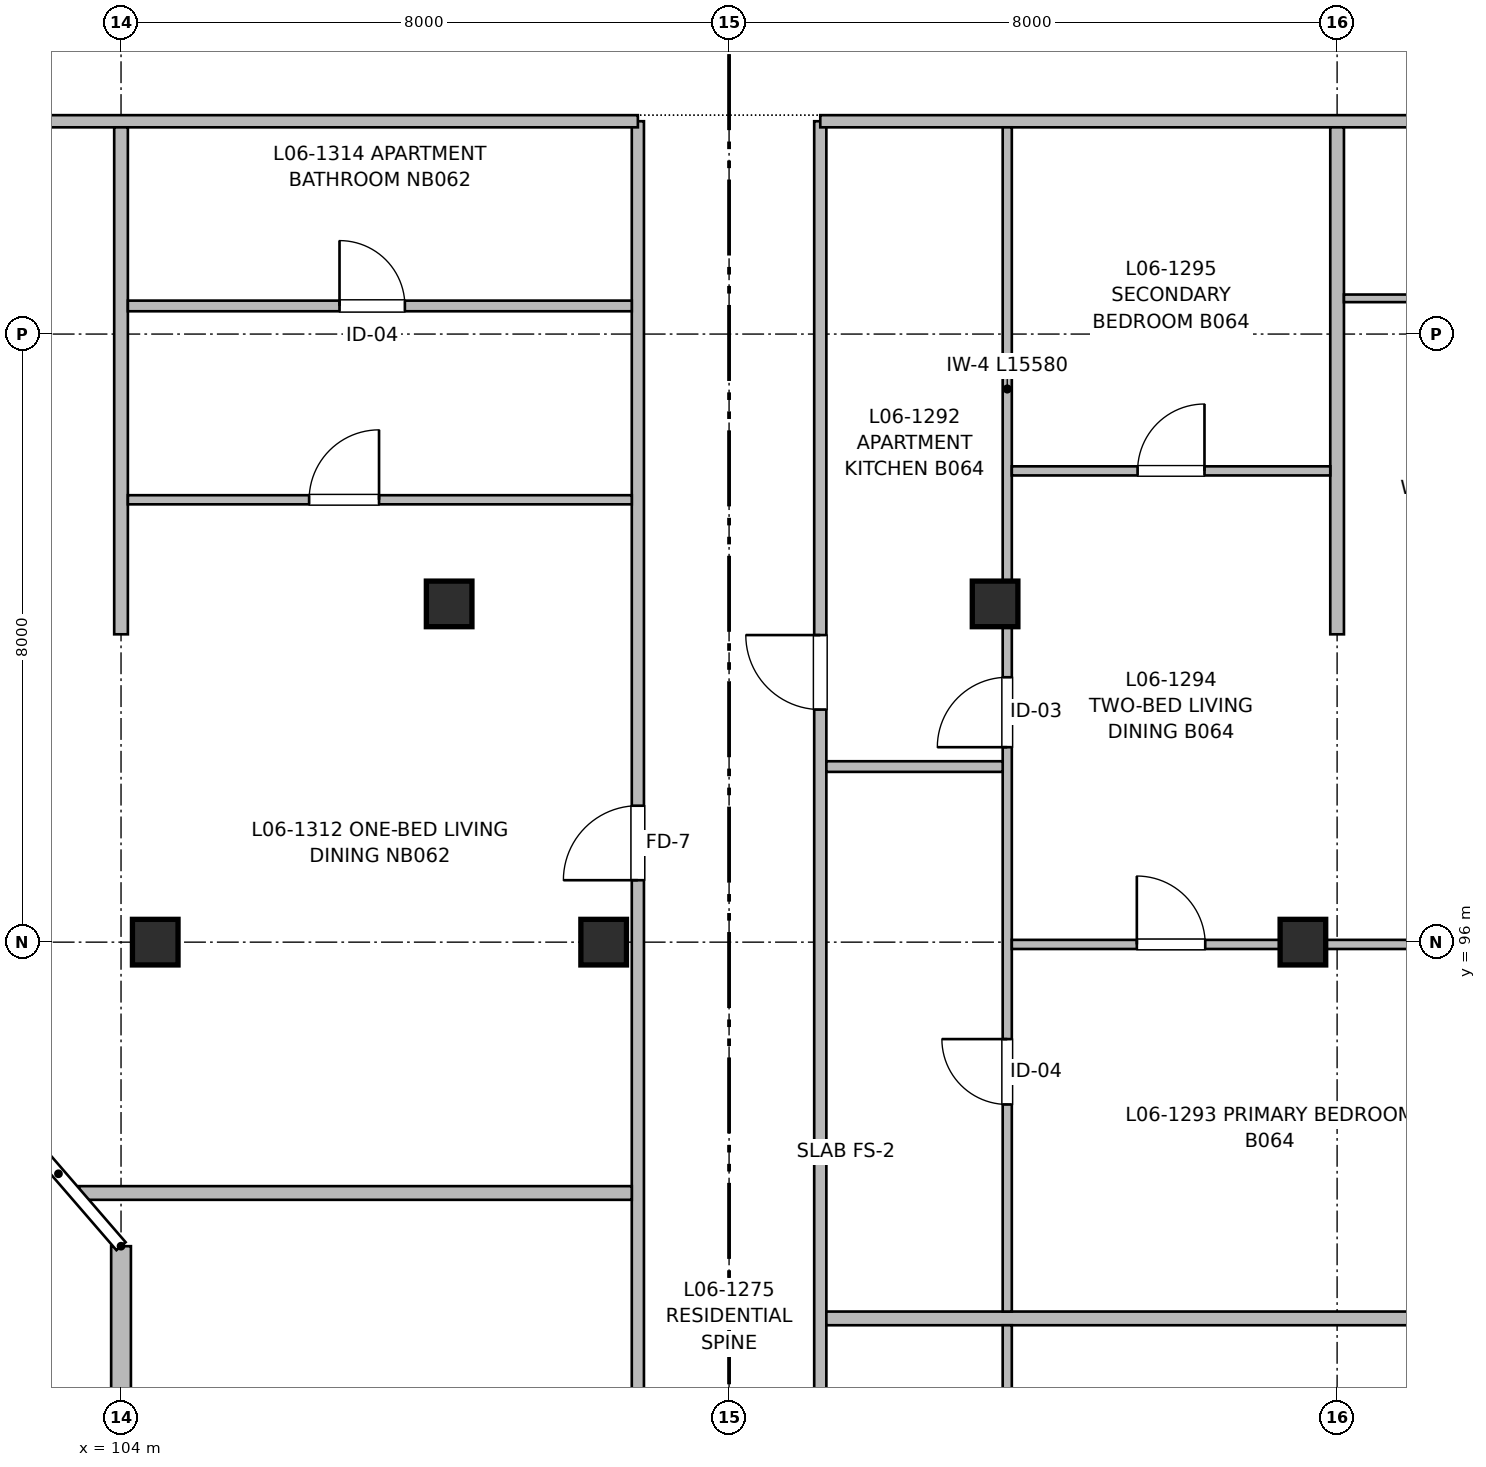
"""IFC4 building model, lengths in metres.
Left out: names, types, materials, properties, quantities, classifications, styles, units other than length and angle.
Written with IfcOpenShell. Run it as: python <this file> out.ifc"""

import sys

from ifc_helpers import new_model, si_unit, direction, frame, frame_2d, origin, origin_2d, place, context, subcontext, project, spatial, rectangle, extrude, element, fill, save


model = new_model("IFC4")
c1 = context("Model", 3, precision=1e-05, world=origin(), true_north=direction((0.0, 1.0)))
c2 = subcontext(c1, "Body", "Model", "MODEL_VIEW")
j1 = project(units=[si_unit("LENGTHUNIT", "METRE"), si_unit("PLANEANGLEUNIT", "RADIAN")], contexts=[c1])
p1 = place(None, origin())
s1 = spatial("IfcSite", under=j1, at=p1, CompositionType="ELEMENT")
p2 = place(p1, origin())
s2 = spatial("IfcBuilding", under=s1, at=p2, CompositionType="ELEMENT")
p3 = place(p2, frame((0.0, 0.0, 20.16)))
s3 = spatial("IfcBuildingStorey", under=s2, at=p3, CompositionType="ELEMENT", Elevation=20.16)
for number, where, z_axis, x_axis in (
    (1, (104.45, 96.0, 0.0), (0.0, 0.0, 1.0), (1.0, 0.0, 0.0)),
    (2, (108.317, 100.45, 0.0), (0.0, 0.0, 1.0), (1.0, 0.0, 0.0)),
    (3, (110.35, 96.0, 0.0), (0.0, 0.0, 1.0), (1.0, 0.0, 0.0)),
    (4, (115.5, 100.45, 0.0), (0.0, 0.0, 1.0), (1.0, 0.0, 0.0)),
    (5, (119.55, 96.0, 0.0), (0.0, 0.0, 1.0), (1.0, 0.0, 0.0)),
):
    element("IfcColumn", number, at=place(p3, frame(where, z_axis=z_axis, x_axis=x_axis)), inside=s3, PredefinedType="COLUMN", context=c2, shape_type="SweptSolid", body=[
        extrude(rectangle(XDim=0.6, YDim=0.6, at=origin_2d()), origin(), (0.0, 0.0, 1.0), 3.2),
    ])
p4 = place(p3, frame((104.0, 56.0, 0.0), z_axis=(0.0, 0.0, 1.0), x_axis=(0.0, 1.0, 0.0)))
e6 = element("IfcWall", 6, at=p4, inside=s3, PredefinedType="SOLIDWALL", context=c2, shape_type="SweptSolid", body=[
    extrude(rectangle(XDim=36.0, YDim=0.26, at=frame_2d((18.0, 0.0))), origin(), (0.0, 0.0, 1.0), 2.98),
])
p5 = place(p4, frame((3.9, 0.0, 0.0)))
e7 = element("IfcOpeningElement", 7, at=p5, cuts=e6, PredefinedType="OPENING", context=c2, shape_type="SweptSolid", body=[
    extrude(rectangle(XDim=1.2, YDim=2.2, at=frame_2d((0.6, 1.1))), frame((0.0, 0.14, 0.0), z_axis=(0.0, -1.0, 0.0), x_axis=(1.0, 0.0, 0.0)), (0.0, 0.0, 1.0), 0.28),
])
p6 = place(p4, frame((5.8, 0.0, 0.82)))
e8 = element("IfcOpeningElement", 8, at=p6, cuts=e6, PredefinedType="OPENING", context=c2, shape_type="SweptSolid", body=[
    extrude(rectangle(XDim=1.3, YDim=1.4, at=frame_2d((0.65, 0.7))), frame((0.0, 0.14, 0.0), z_axis=(0.0, -1.0, 0.0), x_axis=(1.0, 0.0, 0.0)), (0.0, 0.0, 1.0), 0.28),
])
p7 = place(p4, frame((12.6, 0.0, 0.72)))
e9 = element("IfcOpeningElement", 9, at=p7, cuts=e6, PredefinedType="OPENING", context=c2, shape_type="SweptSolid", body=[
    extrude(rectangle(XDim=1.8, YDim=1.5, at=frame_2d((0.9, 0.75))), frame((0.0, 0.14, 0.0), z_axis=(0.0, -1.0, 0.0), x_axis=(1.0, 0.0, 0.0)), (0.0, 0.0, 1.0), 0.28),
])
p8 = place(p4, frame((19.15, 0.0, 0.72)))
e10 = element("IfcOpeningElement", 10, at=p8, cuts=e6, PredefinedType="OPENING", context=c2, shape_type="SweptSolid", body=[
    extrude(rectangle(XDim=2.0, YDim=1.5, at=frame_2d((1.0, 0.75))), frame((0.0, 0.14, 0.0), z_axis=(0.0, -1.0, 0.0), x_axis=(1.0, 0.0, 0.0)), (0.0, 0.0, 1.0), 0.28),
])
p9 = place(p4, frame((30.675, 0.0, 0.77)))
e11 = element("IfcOpeningElement", 11, at=p9, cuts=e6, PredefinedType="OPENING", context=c2, shape_type="SweptSolid", body=[
    extrude(rectangle(XDim=1.65, YDim=1.45, at=frame_2d((0.825, 0.725))), frame((0.0, 0.14, 0.0), z_axis=(0.0, -1.0, 0.0), x_axis=(1.0, 0.0, 0.0)), (0.0, 0.0, 1.0), 0.28),
])
p10 = place(p3, frame((110.8, 56.16, 0.0), z_axis=(0.0, 0.0, 1.0), x_axis=(0.0, 1.0, 0.0)))
e12 = element("IfcWall", 12, at=p10, inside=s3, PredefinedType="PARTITIONING", context=c2, shape_type="SweptSolid", body=[
    extrude(rectangle(XDim=50.64, YDim=0.16, at=frame_2d((25.32, 0.0))), origin(), (0.0, 0.0, 1.0), 2.935),
])
p11 = place(p10, frame((12.84, 0.0, 0.0)))
e13 = element("IfcOpeningElement", 13, at=p11, cuts=e12, PredefinedType="OPENING", context=c2, shape_type="SweptSolid", body=[
    extrude(rectangle(XDim=1.1, YDim=2.15, at=frame_2d((0.55, 1.075))), frame((0.0, 0.09, 0.0), z_axis=(0.0, -1.0, 0.0), x_axis=(1.0, 0.0, 0.0)), (0.0, 0.0, 1.0), 0.18),
])
p12 = place(p10, frame((19.24, 0.0, 0.0)))
e14 = element("IfcOpeningElement", 14, at=p12, cuts=e12, PredefinedType="OPENING", context=c2, shape_type="SweptSolid", body=[
    extrude(rectangle(XDim=1.6, YDim=2.15, at=frame_2d((0.8, 1.075))), frame((0.0, 0.09, 0.0), z_axis=(0.0, -1.0, 0.0), x_axis=(1.0, 0.0, 0.0)), (0.0, 0.0, 1.0), 0.18),
])
p13 = place(p10, frame((1.8, 0.0, 0.0)))
e15 = element("IfcOpeningElement", 15, at=p13, cuts=e12, PredefinedType="OPENING", context=c2, shape_type="SweptSolid", body=[
    extrude(rectangle(XDim=0.96, YDim=2.15, at=frame_2d((0.48, 1.075))), frame((0.0, 0.09, 0.0), z_axis=(0.0, -1.0, 0.0), x_axis=(1.0, 0.0, 0.0)), (0.0, 0.0, 1.0), 0.18),
])
p14 = place(p10, frame((32.845, 0.0, 0.0)))
e16 = element("IfcOpeningElement", 16, at=p14, cuts=e12, PredefinedType="OPENING", context=c2, shape_type="SweptSolid", body=[
    extrude(rectangle(XDim=0.98, YDim=2.15, at=frame_2d((0.49, 1.075))), frame((0.0, 0.09, 0.0), z_axis=(0.0, -1.0, 0.0), x_axis=(1.0, 0.0, 0.0)), (0.0, 0.0, 1.0), 0.18),
])
p15 = place(p10, frame((40.655, 0.0, 0.0)))
e17 = element("IfcOpeningElement", 17, at=p15, cuts=e12, PredefinedType="OPENING", context=c2, shape_type="SweptSolid", body=[
    extrude(rectangle(XDim=0.98, YDim=2.15, at=frame_2d((0.49, 1.075))), frame((0.0, 0.09, 0.0), z_axis=(0.0, -1.0, 0.0), x_axis=(1.0, 0.0, 0.0)), (0.0, 0.0, 1.0), 0.18),
])
p16 = place(p3, frame((113.2, 56.16, 0.0), z_axis=(0.0, 0.0, 1.0), x_axis=(0.0, 1.0, 0.0)))
e18 = element("IfcWall", 18, at=p16, inside=s3, PredefinedType="PARTITIONING", context=c2, shape_type="SweptSolid", body=[
    extrude(rectangle(XDim=50.64, YDim=0.16, at=frame_2d((25.32, 0.0))), origin(), (0.0, 0.0, 1.0), 2.935),
])
p17 = place(p16, frame((5.59, 0.0, 0.0)))
e19 = element("IfcOpeningElement", 19, at=p17, cuts=e18, PredefinedType="OPENING", context=c2, shape_type="SweptSolid", body=[
    extrude(rectangle(XDim=0.98, YDim=2.15, at=frame_2d((0.49, 1.075))), frame((0.0, 0.09, 0.0), z_axis=(0.0, -1.0, 0.0), x_axis=(1.0, 0.0, 0.0)), (0.0, 0.0, 1.0), 0.18),
])
p18 = place(p16, frame((16.49, 0.0, 0.0)))
e20 = element("IfcOpeningElement", 20, at=p18, cuts=e18, PredefinedType="OPENING", context=c2, shape_type="SweptSolid", body=[
    extrude(rectangle(XDim=0.98, YDim=2.15, at=frame_2d((0.49, 1.075))), frame((0.0, 0.09, 0.0), z_axis=(0.0, -1.0, 0.0), x_axis=(1.0, 0.0, 0.0)), (0.0, 0.0, 1.0), 0.18),
])
p19 = place(p16, frame((28.55, 0.0, 0.0)))
e21 = element("IfcOpeningElement", 21, at=p19, cuts=e18, PredefinedType="OPENING", context=c2, shape_type="SweptSolid", body=[
    extrude(rectangle(XDim=0.98, YDim=2.15, at=frame_2d((0.49, 1.075))), frame((0.0, 0.09, 0.0), z_axis=(0.0, -1.0, 0.0), x_axis=(1.0, 0.0, 0.0)), (0.0, 0.0, 1.0), 0.18),
])
p20 = place(p16, frame((42.9, 0.0, 0.0)))
e22 = element("IfcOpeningElement", 22, at=p20, cuts=e18, PredefinedType="OPENING", context=c2, shape_type="SweptSolid", body=[
    extrude(rectangle(XDim=0.98, YDim=2.15, at=frame_2d((0.49, 1.075))), frame((0.0, 0.09, 0.0), z_axis=(0.0, -1.0, 0.0), x_axis=(1.0, 0.0, 0.0)), (0.0, 0.0, 1.0), 0.18),
])
p21 = place(p3, frame((93.66, 106.8, 0.0), z_axis=(0.0, 0.0, 1.0), x_axis=(1.0, 0.0, 0.0)))
e23 = element("IfcWall", 23, at=p21, inside=s3, PredefinedType="PARTITIONING", context=c2, shape_type="SweptSolid", body=[
    extrude(rectangle(XDim=17.14, YDim=0.16, at=frame_2d((8.57, 0.0))), origin(), (0.0, 0.0, 1.0), 2.935),
])
p22 = place(p3, frame((113.2, 106.8, 0.0), z_axis=(0.0, 0.0, 1.0), x_axis=(1.0, 0.0, 0.0)))
e24 = element("IfcWall", 24, at=p22, inside=s3, PredefinedType="PARTITIONING", context=c2, shape_type="SweptSolid", body=[
    extrude(rectangle(XDim=24.14, YDim=0.16, at=frame_2d((12.07, 0.0))), origin(), (0.0, 0.0, 1.0), 2.935),
])
p23 = place(p22, frame((19.575, 0.0, 0.0)))
e25 = element("IfcOpeningElement", 25, at=p23, cuts=e24, PredefinedType="OPENING", context=c2, shape_type="SweptSolid", body=[
    extrude(rectangle(XDim=1.05, YDim=2.15, at=frame_2d((0.525, 1.075))), frame((0.0, 0.09, 0.0), z_axis=(0.0, -1.0, 0.0), x_axis=(1.0, 0.0, 0.0)), (0.0, 0.0, 1.0), 0.18),
])
p24 = place(p22, frame((8.995, 0.0, 0.0)))
e26 = element("IfcOpeningElement", 26, at=p24, cuts=e24, PredefinedType="OPENING", context=c2, shape_type="SweptSolid", body=[
    extrude(rectangle(XDim=0.98, YDim=2.15, at=frame_2d((0.49, 1.075))), frame((0.0, 0.09, 0.0), z_axis=(0.0, -1.0, 0.0), x_axis=(1.0, 0.0, 0.0)), (0.0, 0.0, 1.0), 0.18),
])
for number, where, z_axis, x_axis in (
    (27, (120.0, 100.05, 0.0), (0.0, 0.0, 1.0), (0.0, 1.0, 0.0)),
    (28, (104.0, 100.05, 0.0), (0.0, 0.0, 1.0), (0.0, 1.0, 0.0)),
):
    element("IfcWall", number, at=place(p3, frame(where, z_axis=z_axis, x_axis=x_axis)), inside=s3, PredefinedType="PARTITIONING", context=c2, shape_type="SweptSolid", body=[
        extrude(rectangle(XDim=6.67, YDim=0.18, at=frame_2d((3.335, 0.0))), origin(), (0.0, 0.0, 1.0), 2.935),
    ])
p25 = place(p3, frame((113.28, 91.05, 0.0), z_axis=(0.0, 0.0, 1.0), x_axis=(1.0, 0.0, 0.0)))
e29 = element("IfcWall", 29, at=p25, inside=s3, PredefinedType="PARTITIONING", context=c2, shape_type="SweptSolid", body=[
    extrude(rectangle(XDim=9.115, YDim=0.18, at=frame_2d((4.558, 0.0))), origin(), (0.0, 0.0, 1.0), 2.935),
])
p26 = place(p3, frame((115.66, 77.99, 0.0), z_axis=(0.0, 0.0, 1.0), x_axis=(0.0, 1.0, 0.0)))
e30 = element("IfcWall", 30, at=p26, inside=s3, PredefinedType="PARTITIONING", context=c2, shape_type="SweptSolid", body=[
    extrude(rectangle(XDim=12.97, YDim=0.12, at=frame_2d((6.485, 0.0))), origin(), (0.0, 0.0, 1.0), 2.935),
])
p27 = place(p26, frame((2.269, 0.0, 0.0)))
e31 = element("IfcOpeningElement", 31, at=p27, cuts=e30, PredefinedType="OPENING", context=c2, shape_type="SweptSolid", body=[
    extrude(rectangle(XDim=0.86, YDim=2.1, at=frame_2d((0.43, 1.05))), frame((0.0, 0.07, 0.0), z_axis=(0.0, -1.0, 0.0), x_axis=(1.0, 0.0, 0.0)), (0.0, 0.0, 1.0), 0.14),
])
p28 = place(p26, frame((7.93, 0.0, 0.0)))
e32 = element("IfcOpeningElement", 32, at=p28, cuts=e30, PredefinedType="OPENING", context=c2, shape_type="SweptSolid", body=[
    extrude(rectangle(XDim=0.92, YDim=2.1, at=frame_2d((0.46, 1.05))), frame((0.0, 0.07, 0.0), z_axis=(0.0, -1.0, 0.0), x_axis=(1.0, 0.0, 0.0)), (0.0, 0.0, 1.0), 0.14),
])
p29 = place(p3, frame((115.66, 91.14, 0.0), z_axis=(0.0, 0.0, 1.0), x_axis=(0.0, 1.0, 0.0)))
e33 = element("IfcWall", 33, at=p29, inside=s3, PredefinedType="PARTITIONING", context=c2, shape_type="SweptSolid", body=[
    extrude(rectangle(XDim=15.58, YDim=0.12, at=frame_2d((7.79, 0.0))), origin(), (0.0, 0.0, 1.0), 2.68),
])
p30 = place(p29, frame((2.725, 0.0, 0.0)))
e34 = element("IfcOpeningElement", 34, at=p30, cuts=e33, PredefinedType="OPENING", context=c2, shape_type="SweptSolid", body=[
    extrude(rectangle(XDim=0.86, YDim=2.1, at=frame_2d((0.43, 1.05))), frame((0.0, 0.07, 0.0), z_axis=(0.0, -1.0, 0.0), x_axis=(1.0, 0.0, 0.0)), (0.0, 0.0, 1.0), 0.14),
])
p31 = place(p29, frame((7.425, 0.0, 0.0)))
e35 = element("IfcOpeningElement", 35, at=p31, cuts=e33, PredefinedType="OPENING", context=c2, shape_type="SweptSolid", body=[
    extrude(rectangle(XDim=0.92, YDim=2.1, at=frame_2d((0.46, 1.05))), frame((0.0, 0.07, 0.0), z_axis=(0.0, -1.0, 0.0), x_axis=(1.0, 0.0, 0.0)), (0.0, 0.0, 1.0), 0.14),
])
p32 = place(p3, frame((113.28, 98.31, 0.0), z_axis=(0.0, 0.0, 1.0), x_axis=(1.0, 0.0, 0.0)))
e36 = element("IfcWall", 36, at=p32, inside=s3, PredefinedType="PARTITIONING", context=c2, shape_type="SweptSolid", body=[
    extrude(rectangle(XDim=2.32, YDim=0.14, at=frame_2d((1.16, 0.0))), origin(), (0.0, 0.0, 1.0), 2.935),
])
p33 = place(p3, frame((115.72, 95.97, 0.0), z_axis=(0.0, 0.0, 1.0), x_axis=(1.0, 0.0, 0.0)))
e37 = element("IfcWall", 37, at=p33, inside=s3, PredefinedType="PARTITIONING", context=c2, shape_type="SweptSolid", body=[
    extrude(rectangle(XDim=11.317, YDim=0.12, at=frame_2d((5.659, 0.0))), origin(), (0.0, 0.0, 1.0), 2.53),
])
p34 = place(p33, frame((1.645, 0.0, 0.0)))
e38 = element("IfcOpeningElement", 38, at=p34, cuts=e37, PredefinedType="OPENING", context=c2, shape_type="SweptSolid", body=[
    extrude(rectangle(XDim=0.9, YDim=2.1, at=frame_2d((0.45, 1.05))), frame((0.0, 0.07, 0.0), z_axis=(0.0, -1.0, 0.0), x_axis=(1.0, 0.0, 0.0)), (0.0, 0.0, 1.0), 0.14),
])
p35 = place(p3, frame((115.72, 102.2, 0.0), z_axis=(0.0, 0.0, 1.0), x_axis=(1.0, 0.0, 0.0)))
e39 = element("IfcWall", 39, at=p35, inside=s3, PredefinedType="PARTITIONING", context=c2, shape_type="SweptSolid", body=[
    extrude(rectangle(XDim=4.19, YDim=0.12, at=frame_2d((2.095, 0.0))), origin(), (0.0, 0.0, 1.0), 2.935),
])
p36 = place(p35, frame((1.655, 0.0, 0.0)))
e40 = element("IfcOpeningElement", 40, at=p36, cuts=e39, PredefinedType="OPENING", context=c2, shape_type="SweptSolid", body=[
    extrude(rectangle(XDim=0.88, YDim=2.1, at=frame_2d((0.44, 1.05))), frame((0.0, 0.07, 0.0), z_axis=(0.0, -1.0, 0.0), x_axis=(1.0, 0.0, 0.0)), (0.0, 0.0, 1.0), 0.14),
])
p37 = place(p3, frame((120.09, 104.47, 0.0), z_axis=(0.0, 0.0, 1.0), x_axis=(1.0, 0.0, 0.0)))
e41 = element("IfcWall", 41, at=p37, inside=s3, PredefinedType="PARTITIONING", context=c2, shape_type="SweptSolid", body=[
    extrude(rectangle(XDim=5.13, YDim=0.1, at=frame_2d((2.565, 0.0))), origin(), (0.0, 0.0, 1.0), 2.935),
])
p38 = place(p37, frame((2.18, 0.0, 0.0)))
e42 = element("IfcOpeningElement", 42, at=p38, cuts=e41, PredefinedType="OPENING", context=c2, shape_type="SweptSolid", body=[
    extrude(rectangle(XDim=0.92, YDim=2.1, at=frame_2d((0.46, 1.05))), frame((0.0, 0.06, 0.0), z_axis=(0.0, -1.0, 0.0), x_axis=(1.0, 0.0, 0.0)), (0.0, 0.0, 1.0), 0.12),
])
p39 = place(p3, frame((103.448, 92.7, 0.0), z_axis=(0.0, 0.0, 1.0), x_axis=(1.0, 0.0, 0.0)))
e43 = element("IfcWall", 43, at=p39, inside=s3, PredefinedType="PARTITIONING", context=c2, shape_type="SweptSolid", body=[
    extrude(rectangle(XDim=7.272, YDim=0.18, at=frame_2d((3.636, 0.0))), origin(), (0.0, 0.0, 1.0), 2.935),
])
p40 = place(p3, frame((104.09, 101.82, 0.0), z_axis=(0.0, 0.0, 1.0), x_axis=(1.0, 0.0, 0.0)))
e44 = element("IfcWall", 44, at=p40, inside=s3, PredefinedType="PARTITIONING", context=c2, shape_type="SweptSolid", body=[
    extrude(rectangle(XDim=6.63, YDim=0.12, at=frame_2d((3.315, 0.0))), origin(), (0.0, 0.0, 1.0), 2.935),
])
p41 = place(p40, frame((2.385, 0.0, 0.0)))
e45 = element("IfcOpeningElement", 45, at=p41, cuts=e44, PredefinedType="OPENING", context=c2, shape_type="SweptSolid", body=[
    extrude(rectangle(XDim=0.92, YDim=2.1, at=frame_2d((0.46, 1.05))), frame((0.0, 0.07, 0.0), z_axis=(0.0, -1.0, 0.0), x_axis=(1.0, 0.0, 0.0)), (0.0, 0.0, 1.0), 0.14),
])
p42 = place(p3, frame((104.09, 104.37, 0.0), z_axis=(0.0, 0.0, 1.0), x_axis=(1.0, 0.0, 0.0)))
e46 = element("IfcWall", 46, at=p42, inside=s3, PredefinedType="PARTITIONING", context=c2, shape_type="SweptSolid", body=[
    extrude(rectangle(XDim=6.63, YDim=0.14, at=frame_2d((3.315, 0.0))), origin(), (0.0, 0.0, 1.0), 2.935),
])
p43 = place(p42, frame((2.785, 0.0, 0.0)))
e47 = element("IfcOpeningElement", 47, at=p43, cuts=e46, PredefinedType="OPENING", context=c2, shape_type="SweptSolid", body=[
    extrude(rectangle(XDim=0.86, YDim=2.1, at=frame_2d((0.43, 1.05))), frame((0.0, 0.08, 0.0), z_axis=(0.0, -1.0, 0.0), x_axis=(1.0, 0.0, 0.0)), (0.0, 0.0, 1.0), 0.16),
])
p44 = place(p30, origin())
e48 = element("IfcDoor", 48, at=p44, inside=s3, OperationType="SINGLE_SWING_RIGHT", PredefinedType="DOOR", context=c2, shape_type="SweptSolid", body=[
    extrude(rectangle(XDim=0.86, YDim=2.1, at=frame_2d((0.43, 1.05))), frame((0.0, 0.025, 0.0), z_axis=(0.0, -1.0, 0.0), x_axis=(1.0, 0.0, 0.0)), (0.0, 0.0, 1.0), 0.05),
])
fill(e34, e48)
p45 = place(p31, origin())
e49 = element("IfcDoor", 49, at=p45, inside=s3, OperationType="SINGLE_SWING_LEFT", PredefinedType="DOOR", context=c2, shape_type="SweptSolid", body=[
    extrude(rectangle(XDim=0.92, YDim=2.1, at=frame_2d((0.46, 1.05))), frame((0.0, 0.025, 0.0), z_axis=(0.0, -1.0, 0.0), x_axis=(1.0, 0.0, 0.0)), (0.0, 0.0, 1.0), 0.05),
])
fill(e35, e49)
p46 = place(p20, origin())
e50 = element("IfcDoor", 50, at=p46, inside=s3, OperationType="SINGLE_SWING_RIGHT", PredefinedType="DOOR", context=c2, shape_type="SweptSolid", body=[
    extrude(rectangle(XDim=0.98, YDim=2.15, at=frame_2d((0.49, 1.075))), frame((0.0, 0.025, 0.0), z_axis=(0.0, -1.0, 0.0), x_axis=(1.0, 0.0, 0.0)), (0.0, 0.0, 1.0), 0.05),
])
fill(e22, e50)
p47 = place(p34, origin())
e51 = element("IfcDoor", 51, at=p47, inside=s3, OperationType="SINGLE_SWING_LEFT", PredefinedType="DOOR", context=c2, shape_type="SweptSolid", body=[
    extrude(rectangle(XDim=0.9, YDim=2.1, at=frame_2d((0.45, 1.05))), frame((0.0, 0.025, 0.0), z_axis=(0.0, -1.0, 0.0), x_axis=(1.0, 0.0, 0.0)), (0.0, 0.0, 1.0), 0.05),
])
fill(e38, e51)
p48 = place(p36, origin())
e52 = element("IfcDoor", 52, at=p48, inside=s3, OperationType="SINGLE_SWING_RIGHT", PredefinedType="DOOR", context=c2, shape_type="SweptSolid", body=[
    extrude(rectangle(XDim=0.88, YDim=2.1, at=frame_2d((0.44, 1.05))), frame((0.0, 0.025, 0.0), z_axis=(0.0, -1.0, 0.0), x_axis=(1.0, 0.0, 0.0)), (0.0, 0.0, 1.0), 0.05),
])
fill(e40, e52)
p49 = place(p43, origin())
e53 = element("IfcDoor", 53, at=p49, inside=s3, OperationType="SINGLE_SWING_LEFT", PredefinedType="DOOR", context=c2, shape_type="SweptSolid", body=[
    extrude(rectangle(XDim=0.86, YDim=2.1, at=frame_2d((0.43, 1.05))), frame((0.0, 0.025, 0.0), z_axis=(0.0, -1.0, 0.0), x_axis=(1.0, 0.0, 0.0)), (0.0, 0.0, 1.0), 0.05),
])
fill(e47, e53)
p50 = place(p41, origin())
e54 = element("IfcDoor", 54, at=p50, inside=s3, OperationType="SINGLE_SWING_RIGHT", PredefinedType="DOOR", context=c2, shape_type="SweptSolid", body=[
    extrude(rectangle(XDim=0.92, YDim=2.1, at=frame_2d((0.46, 1.05))), frame((0.0, 0.025, 0.0), z_axis=(0.0, -1.0, 0.0), x_axis=(1.0, 0.0, 0.0)), (0.0, 0.0, 1.0), 0.05),
])
fill(e45, e54)
p51 = place(p15, origin())
e55 = element("IfcDoor", 55, at=p51, inside=s3, OperationType="SINGLE_SWING_LEFT", PredefinedType="DOOR", context=c2, shape_type="SweptSolid", body=[
    extrude(rectangle(XDim=0.98, YDim=2.15, at=frame_2d((0.49, 1.075))), frame((0.0, 0.025, 0.0), z_axis=(0.0, -1.0, 0.0), x_axis=(1.0, 0.0, 0.0)), (0.0, 0.0, 1.0), 0.05),
])
fill(e17, e55)
save(model, sys.argv[1])
